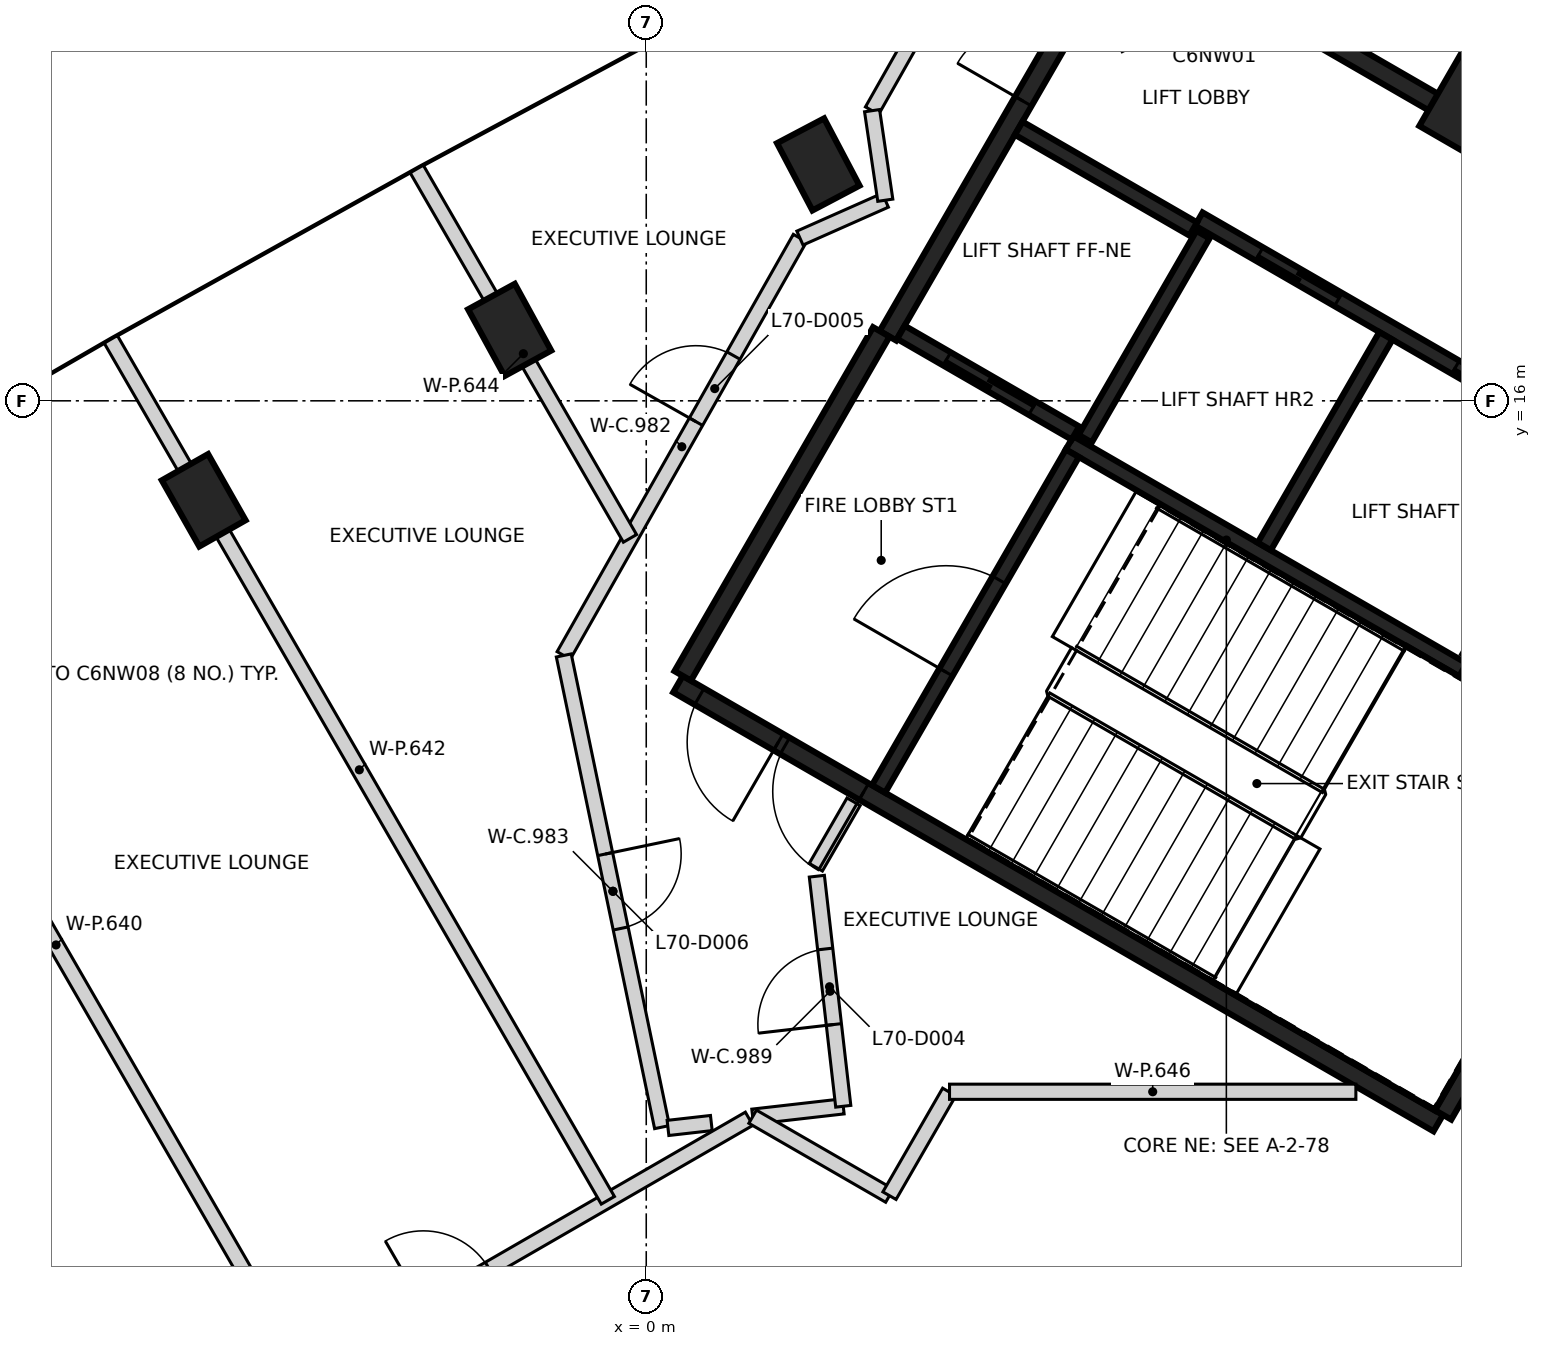
"""IFC4 building model, lengths in metres.
Left out: names, types, materials, properties, quantities, classifications, styles, units other than length and angle.
Written with IfcOpenShell. Run it as: python <this file> out.ifc"""

import sys

from ifc_helpers import new_model, si_unit, direction, frame, frame_2d, origin, origin_2d, place, context, subcontext, project, spatial, rectangle, extrude, element, fill, save


model = new_model("IFC4")
c1 = context("Model", 3, precision=1e-05, world=origin(), true_north=direction((0.0, 1.0)))
c2 = subcontext(c1, "Body", "Model", "MODEL_VIEW")
j1 = project(units=[si_unit("LENGTHUNIT", "METRE"), si_unit("PLANEANGLEUNIT", "RADIAN")], contexts=[c1])
p1 = place(None, origin())
s1 = spatial("IfcSite", under=j1, at=p1, CompositionType="ELEMENT")
p2 = place(p1, origin())
s2 = spatial("IfcBuilding", under=s1, at=p2, CompositionType="ELEMENT")
p3 = place(p2, frame((0.0, 0.0, 276.6)))
s3 = spatial("IfcBuildingStorey", under=s2, at=p3, CompositionType="ELEMENT", Elevation=276.6)
for number, where, z_axis, x_axis in (
    (1, (2.263, 19.11, -0.35), (0.0, 0.0, 1.0), (-0.466, 0.885, 0.0)),
    (2, (-1.797, 16.932, -0.35), (0.0, 0.0, 1.0), (-0.479, 0.878, 0.0)),
    (3, (-5.822, 14.691, -0.35), (0.0, 0.0, 1.0), (-0.493, 0.87, 0.0)),
):
    element("IfcColumn", number, at=place(p3, frame(where, z_axis=z_axis, x_axis=x_axis)), inside=s3, PredefinedType="COLUMN", context=c2, shape_type="SweptSolid", body=[
        extrude(rectangle(XDim=1.0, YDim=0.7, at=origin_2d()), origin(), (0.0, 0.0, 1.0), 3.6),
    ])
p4 = place(p3, frame((11.637, 20.155, -0.35), z_axis=(0.0, 0.0, 1.0), x_axis=(0.5, 0.866025403784, 0.0)))
e4 = element("IfcColumn", 4, at=p4, inside=s3, PredefinedType="COLUMN", context=c2, shape_type="SweptSolid", body=[
    extrude(rectangle(XDim=2.4, YDim=2.0, at=origin_2d()), origin(), (0.0, 0.0, 1.0), 3.6),
])
p5 = place(p3, frame((10.42, 6.498, 0.0), z_axis=(0.0, 0.0, 1.0), x_axis=(-0.866021906294, 0.500006057782, 0.0)))
e5 = element("IfcWall", 5, at=p5, inside=s3, PredefinedType="SHEAR", context=c2, shape_type="SweptSolid", body=[
    extrude(rectangle(XDim=11.55, YDim=0.25, at=frame_2d((5.775, 0.0))), origin(), (0.0, 0.0, 1.0), 3.25),
])
p6 = place(p5, frame((10.025, 0.0, 0.0)))
e6 = element("IfcOpeningElement", 6, at=p6, cuts=e5, PredefinedType="OPENING", context=c2, shape_type="SweptSolid", body=[
    extrude(rectangle(XDim=1.2, YDim=2.1, at=frame_2d((0.6, 1.05))), frame((0.0, 0.135, 0.0), z_axis=(0.0, -1.0, 0.0), x_axis=(1.0, 0.0, 0.0)), (0.0, 0.0, 1.0), 0.27),
])
p7 = place(p5, frame((8.725, 0.0, 0.0)))
e7 = element("IfcOpeningElement", 7, at=p7, cuts=e5, PredefinedType="OPENING", context=c2, shape_type="SweptSolid", body=[
    extrude(rectangle(XDim=1.2, YDim=2.1, at=frame_2d((0.6, 1.05))), frame((0.0, 0.135, 0.0), z_axis=(0.0, -1.0, 0.0), x_axis=(1.0, 0.0, 0.0)), (0.0, 0.0, 1.0), 0.27),
])
p8 = place(p3, frame((6.304, 22.269, 0.0), z_axis=(0.0, 0.0, 1.0), x_axis=(0.866022959057, -0.500004234368, 0.0)))
e8 = element("IfcWall", 8, at=p8, inside=s3, PredefinedType="SHEAR", context=c2, shape_type="SweptSolid", body=[
    extrude(rectangle(XDim=8.75, YDim=0.25, at=frame_2d((4.375, 0.0))), origin(), (0.0, 0.0, 1.0), 3.25),
])
p9 = place(p3, frame((3.179, 16.856, 0.0), z_axis=(0.0, 0.0, 1.0), x_axis=(0.500001955336, 0.866024274868, 0.0)))
e9 = element("IfcWall", 9, at=p9, inside=s3, PredefinedType="SHEAR", context=c2, shape_type="SweptSolid", body=[
    extrude(rectangle(XDim=6.125, YDim=0.25, at=frame_2d((3.062, 0.0))), origin(), (0.0, 0.0, 1.0), 3.25),
])
p10 = place(p9, frame((3.563, 0.0, 0.0)))
e10 = element("IfcOpeningElement", 10, at=p10, cuts=e9, PredefinedType="OPENING", context=c2, shape_type="SweptSolid", body=[
    extrude(rectangle(XDim=1.0, YDim=2.1, at=frame_2d((0.5, 1.05))), frame((0.0, 0.135, 0.0), z_axis=(0.0, -1.0, 0.0), x_axis=(1.0, 0.0, 0.0)), (0.0, 0.0, 1.0), 0.27),
])
p11 = place(p3, frame((0.48, 12.381, 0.0), z_axis=(0.0, 0.0, 1.0), x_axis=(0.49999885962, 0.866026062182, 0.0)))
e11 = element("IfcWall", 11, at=p11, inside=s3, PredefinedType="SHEAR", context=c2, shape_type="SweptSolid", body=[
    extrude(rectangle(XDim=5.225, YDim=0.25, at=frame_2d((2.612, 0.0))), origin(), (0.0, 0.0, 1.0), 3.25),
])
p12 = place(p3, frame((13.238, 11.378, 0.0), z_axis=(0.0, 0.0, 1.0), x_axis=(-0.500008851346, -0.866020293397, 0.0)))
e12 = element("IfcWall", 12, at=p12, inside=s3, PredefinedType="SHEAR", context=c2, shape_type="SweptSolid", body=[
    extrude(rectangle(XDim=5.51, YDim=0.25, at=frame_2d((2.755, 0.0))), origin(), (0.0, 0.0, 1.0), 3.25),
])
p13 = place(p3, frame((10.757, 12.481, 0.0), z_axis=(0.0, 0.0, 1.0), x_axis=(0.866022940537, -0.500004266446, 0.0)))
e13 = element("IfcWall", 13, at=p13, inside=s3, PredefinedType="SHEAR", context=c2, shape_type="SweptSolid", body=[
    extrude(rectangle(XDim=2.575, YDim=0.25, at=frame_2d((1.287, 0.0))), origin(), (0.0, 0.0, 1.0), 3.25),
])
p14 = place(p3, frame((12.552, 15.342, 0.0), z_axis=(0.0, 0.0, 1.0), x_axis=(-0.866030299012, 0.499991521122, 0.0)))
e14 = element("IfcWall", 14, at=p14, inside=s3, PredefinedType="SHEAR", context=c2, shape_type="SweptSolid", body=[
    extrude(rectangle(XDim=6.1, YDim=0.2, at=frame_2d((3.05, 0.0))), origin(), (0.0, 0.0, 1.0), 3.25),
])
p15 = place(p14, frame((1.0, 0.0, 0.0)))
e15 = element("IfcOpeningElement", 15, at=p15, cuts=e14, PredefinedType="OPENING", context=c2, shape_type="SweptSolid", body=[
    extrude(rectangle(XDim=1.2, YDim=2.1, at=frame_2d((0.6, 1.05))), frame((0.0, 0.11, 0.0), z_axis=(0.0, -1.0, 0.0), x_axis=(1.0, 0.0, 0.0)), (0.0, 0.0, 1.0), 0.22),
])
p16 = place(p14, frame((3.982, 0.0, 0.0)))
e16 = element("IfcOpeningElement", 16, at=p16, cuts=e14, PredefinedType="OPENING", context=c2, shape_type="SweptSolid", body=[
    extrude(rectangle(XDim=1.2, YDim=2.1, at=frame_2d((0.6, 1.05))), frame((0.0, 0.11, 0.0), z_axis=(0.0, -1.0, 0.0), x_axis=(1.0, 0.0, 0.0)), (0.0, 0.0, 1.0), 0.22),
])
p17 = place(p3, frame((10.743, 12.46, 0.0), z_axis=(0.0, 0.0, 1.0), x_axis=(-0.866018848283, 0.500011354289, 0.0)))
e17 = element("IfcWall", 17, at=p17, inside=s3, PredefinedType="SHEAR", context=c2, shape_type="SweptSolid", body=[
    extrude(rectangle(XDim=5.974, YDim=0.2, at=frame_2d((2.987, 0.0))), origin(), (0.0, 0.0, 1.0), 3.25),
])
p18 = place(p3, frame((3.057, 10.895, 0.0), z_axis=(0.0, 0.0, 1.0), x_axis=(0.500027839223, 0.866009330205, 0.0)))
e18 = element("IfcWall", 18, at=p18, inside=s3, PredefinedType="SHEAR", context=c2, shape_type="SweptSolid", body=[
    extrude(rectangle(XDim=5.098, YDim=0.2, at=frame_2d((2.549, 0.0))), origin(), (0.0, 0.0, 1.0), 3.25),
])
p19 = place(p18, frame((1.774, 0.0, 0.0)))
e19 = element("IfcOpeningElement", 19, at=p19, cuts=e18, PredefinedType="OPENING", context=c2, shape_type="SweptSolid", body=[
    extrude(rectangle(XDim=1.4, YDim=2.1, at=frame_2d((0.7, 1.05))), frame((0.0, 0.11, 0.0), z_axis=(0.0, -1.0, 0.0), x_axis=(1.0, 0.0, 0.0)), (0.0, 0.0, 1.0), 0.22),
])
p20 = place(p3, frame((8.132, 14.084, 0.0), z_axis=(0.0, 0.0, 1.0), x_axis=(0.500030834389, 0.86600760081, 0.0)))
e20 = element("IfcWall", 20, at=p20, inside=s3, PredefinedType="SHEAR", context=c2, shape_type="SweptSolid", body=[
    extrude(rectangle(XDim=3.198, YDim=0.2, at=frame_2d((1.599, 0.0))), origin(), (0.0, 0.0, 1.0), 3.25),
])
p21 = place(p3, frame((7.324, 18.187, 0.0), z_axis=(0.0, 0.0, 1.0), x_axis=(-0.499967891604, -0.866043940782, 0.0)))
e21 = element("IfcWall", 21, at=p21, inside=s3, PredefinedType="SHEAR", context=c2, shape_type="SweptSolid", body=[
    extrude(rectangle(XDim=3.1, YDim=0.2, at=frame_2d((1.55, 0.0))), origin(), (0.0, 0.0, 1.0), 3.25),
])
p22 = place(p3, frame((5.646, 15.576, 0.0), z_axis=(0.0, 0.0, 1.0), x_axis=(-0.866018407898, 0.500012117035, 0.0)))
e22 = element("IfcWall", 22, at=p22, inside=s3, PredefinedType="SHEAR", context=c2, shape_type="SweptSolid", body=[
    extrude(rectangle(XDim=2.651, YDim=0.2, at=frame_2d((1.325, 0.0))), origin(), (0.0, 0.0, 1.0), 3.25),
])
p23 = place(p22, frame((0.652, 0.0, 0.0)))
e23 = element("IfcOpeningElement", 23, at=p23, cuts=e22, PredefinedType="OPENING", context=c2, shape_type="SweptSolid", body=[
    extrude(rectangle(XDim=1.3, YDim=2.1, at=frame_2d((0.65, 1.05))), frame((0.0, 0.11, 0.0), z_axis=(0.0, -1.0, 0.0), x_axis=(1.0, 0.0, 0.0)), (0.0, 0.0, 1.0), 0.22),
])
p24 = place(p3, frame((7.196, 18.26, 0.0), z_axis=(0.0, 0.0, 1.0), x_axis=(-0.866018407898, 0.500012117035, 0.0)))
e24 = element("IfcWall", 24, at=p24, inside=s3, PredefinedType="SHEAR", context=c2, shape_type="SweptSolid", body=[
    extrude(rectangle(XDim=2.651, YDim=0.2, at=frame_2d((1.325, 0.0))), origin(), (0.0, 0.0, 1.0), 3.25),
])
p25 = place(p3, frame((-6.4, 2.079, 0.0), z_axis=(0.0, 0.0, 1.0), x_axis=(0.866044821263, 0.499966366432, 0.0)))
e25 = element("IfcWall", 25, at=p25, inside=s3, PredefinedType="PARTITIONING", context=c2, shape_type="SweptSolid", body=[
    extrude(rectangle(XDim=8.953, YDim=0.2, at=frame_2d((4.477, 0.0))), origin(), (0.0, 0.0, 1.0), 3.25),
])
p26 = place(p25, frame((4.003, 0.0, 0.0)))
e26 = element("IfcOpeningElement", 26, at=p26, cuts=e25, PredefinedType="OPENING", context=c2, shape_type="SweptSolid", body=[
    extrude(rectangle(XDim=1.0, YDim=2.1, at=frame_2d((0.5, 1.05))), frame((0.0, 0.11, 0.0), z_axis=(0.0, -1.0, 0.0), x_axis=(1.0, 0.0, 0.0)), (0.0, 0.0, 1.0), 0.22),
])
p27 = place(p3, frame((-1.086, 12.65, 0.0), z_axis=(0.0, 0.0, 1.0), x_axis=(0.492563383526, 0.870276572826, 0.0)))
e27 = element("IfcWall", 27, at=p27, inside=s3, PredefinedType="PARTITIONING", context=c2, shape_type="SweptSolid", body=[
    extrude(rectangle(XDim=6.309, YDim=0.2, at=frame_2d((3.155, 0.0))), origin(), (0.0, 0.0, 1.0), 3.25),
])
p28 = place(p27, frame((3.533, 0.0, 0.0)))
e28 = element("IfcOpeningElement", 28, at=p28, cuts=e27, PredefinedType="OPENING", context=c2, shape_type="SweptSolid", body=[
    extrude(rectangle(XDim=1.0, YDim=2.1, at=frame_2d((0.5, 1.05))), frame((0.0, 0.11, 0.0), z_axis=(0.0, -1.0, 0.0), x_axis=(1.0, 0.0, 0.0)), (0.0, 0.0, 1.0), 0.22),
])
p29 = place(p3, frame((-1.085, 12.65, 0.0), z_axis=(0.0, 0.0, 1.0), x_axis=(0.203998862084, -0.97897112535, 0.0)))
e29 = element("IfcWall", 29, at=p29, inside=s3, PredefinedType="PARTITIONING", context=c2, shape_type="SweptSolid", body=[
    extrude(rectangle(XDim=6.338, YDim=0.2, at=frame_2d((3.169, 0.0))), origin(), (0.0, 0.0, 1.0), 3.25),
])
p30 = place(p29, frame((2.669, 0.0, 0.0)))
e30 = element("IfcOpeningElement", 30, at=p30, cuts=e29, PredefinedType="OPENING", context=c2, shape_type="SweptSolid", body=[
    extrude(rectangle(XDim=1.0, YDim=2.1, at=frame_2d((0.5, 1.05))), frame((0.0, 0.11, 0.0), z_axis=(0.0, -1.0, 0.0), x_axis=(1.0, 0.0, 0.0)), (0.0, 0.0, 1.0), 0.22),
])
p31 = place(p3, frame((0.286, 6.434, 0.0), z_axis=(0.0, 0.0, 1.0), x_axis=(0.993674480486, 0.112298828274, 0.0)))
e31 = element("IfcWall", 31, at=p31, inside=s3, PredefinedType="PARTITIONING", context=c2, shape_type="SweptSolid", body=[
    extrude(rectangle(XDim=0.574, YDim=0.2, at=frame_2d((0.287, 0.0))), origin(), (0.0, 0.0, 1.0), 3.25),
])
p32 = place(p3, frame((1.4, 6.582, 0.0), z_axis=(0.0, 0.0, 1.0), x_axis=(0.993556915844, 0.11333426216, 0.0)))
e32 = element("IfcWall", 32, at=p32, inside=s3, PredefinedType="PARTITIONING", context=c2, shape_type="SweptSolid", body=[
    extrude(rectangle(XDim=1.2, YDim=0.2, at=frame_2d((0.6, 0.0))), origin(), (0.0, 0.0, 1.0), 3.25),
])
p33 = place(p3, frame((1.4, 6.582, 0.0), z_axis=(0.0, 0.0, 1.0), x_axis=(0.866066271601, -0.499929208183, 0.0)))
e33 = element("IfcWall", 33, at=p33, inside=s3, PredefinedType="PARTITIONING", context=c2, shape_type="SweptSolid", body=[
    extrude(rectangle(XDim=2.078, YDim=0.2, at=frame_2d((1.039, 0.0))), origin(), (0.0, 0.0, 1.0), 3.25),
])
p34 = place(p3, frame((2.022, 18.141, 0.0), z_axis=(0.0, 0.0, 1.0), x_axis=(0.914212683456, 0.405234709036, 0.0)))
e34 = element("IfcWall", 34, at=p34, inside=s3, PredefinedType="PARTITIONING", context=c2, shape_type="SweptSolid", body=[
    extrude(rectangle(XDim=1.229, YDim=0.2, at=frame_2d((0.614, 0.0))), origin(), (0.0, 0.0, 1.0), 3.25),
])
p35 = place(p3, frame((2.592, 6.719, 0.0), z_axis=(0.0, 0.0, 1.0), x_axis=(-0.114027951455, 0.993477541914, 0.0)))
e35 = element("IfcWall", 35, at=p35, inside=s3, PredefinedType="PARTITIONING", context=c2, shape_type="SweptSolid", body=[
    extrude(rectangle(XDim=3.047, YDim=0.2, at=frame_2d((1.523, 0.0))), origin(), (0.0, 0.0, 1.0), 3.25),
])
p36 = place(p35, frame((1.083, 0.0, 0.0)))
e36 = element("IfcOpeningElement", 36, at=p36, cuts=e35, PredefinedType="OPENING", context=c2, shape_type="SweptSolid", body=[
    extrude(rectangle(XDim=1.0, YDim=2.1, at=frame_2d((0.5, 1.05))), frame((0.0, 0.11, 0.0), z_axis=(0.0, -1.0, 0.0), x_axis=(1.0, 0.0, 0.0)), (0.0, 0.0, 1.0), 0.22),
])
p37 = place(p3, frame((2.231, 9.864, 0.0), z_axis=(0.0, 0.0, 1.0), x_axis=(0.499942098031, 0.866058830921, 0.0)))
e37 = element("IfcWall", 37, at=p37, inside=s3, PredefinedType="PARTITIONING", context=c2, shape_type="SweptSolid", body=[
    extrude(rectangle(XDim=0.994, YDim=0.2, at=frame_2d((0.497, 0.0))), origin(), (0.0, 0.0, 1.0), 3.25),
])
p38 = place(p3, frame((2.971, 19.817, 0.0), z_axis=(0.0, 0.0, 1.0), x_axis=(0.492596700535, 0.870257715061, 0.0)))
e38 = element("IfcWall", 38, at=p38, inside=s3, PredefinedType="PARTITIONING", context=c2, shape_type="SweptSolid", body=[
    extrude(rectangle(XDim=2.296, YDim=0.2, at=frame_2d((1.148, 0.0))), origin(), (0.0, 0.0, 1.0), 3.25),
])
p39 = place(p3, frame((2.971, 19.817, 0.0), z_axis=(0.0, 0.0, 1.0), x_axis=(0.146184555477, -0.989257335449, 0.0)))
e39 = element("IfcWall", 39, at=p39, inside=s3, PredefinedType="PARTITIONING", context=c2, shape_type="SweptSolid", body=[
    extrude(rectangle(XDim=1.191, YDim=0.2, at=frame_2d((0.595, 0.0))), origin(), (0.0, 0.0, 1.0), 2.35),
])
p40 = place(p3, frame((-11.035, 14.505, 0.0), z_axis=(0.0, 0.0, 1.0), x_axis=(0.499989597041, -0.866031409852, 0.0)))
e40 = element("IfcWall", 40, at=p40, inside=s3, PredefinedType="PARTITIONING", context=c2, shape_type="SweptSolid", body=[
    extrude(rectangle(XDim=13.079, YDim=0.2, at=frame_2d((6.54, 0.0))), origin(), (0.0, 0.0, 1.0), 3.25),
])
p41 = place(p3, frame((-7.044, 16.809, 0.0), z_axis=(0.0, 0.0, 1.0), x_axis=(0.499997679687, -0.866026743414, 0.0)))
e41 = element("IfcWall", 41, at=p41, inside=s3, PredefinedType="PARTITIONING", context=c2, shape_type="SweptSolid", body=[
    extrude(rectangle(XDim=13.079, YDim=0.2, at=frame_2d((6.54, 0.0))), origin(), (0.0, 0.0, 1.0), 3.25),
])
p42 = place(p3, frame((-3.02, 19.05, 0.0), z_axis=(0.0, 0.0, 1.0), x_axis=(0.499943402613, -0.866058077835, 0.0)))
e42 = element("IfcWall", 42, at=p42, inside=s3, PredefinedType="PARTITIONING", context=c2, shape_type="SweptSolid", body=[
    extrude(rectangle(XDim=5.612, YDim=0.2, at=frame_2d((2.806, 0.0))), origin(), (0.0, 0.0, 1.0), 3.25),
])
p43 = place(p3, frame((3.2, 5.543, 0.0), z_axis=(0.0, 0.0, 1.0), x_axis=(0.499342032259, 0.86640494852, 0.0)))
e43 = element("IfcWall", 43, at=p43, inside=s3, PredefinedType="PARTITIONING", context=c2, shape_type="SweptSolid", body=[
    extrude(rectangle(XDim=1.574, YDim=0.2, at=frame_2d((0.787, 0.0))), origin(), (0.0, 0.0, 1.0), 3.25),
])
p44 = place(p3, frame((3.99, 6.91, 0.0), z_axis=(0.0, 0.0, 1.0), x_axis=(1.0, 0.0, 0.0)))
e44 = element("IfcWall", 44, at=p44, inside=s3, PredefinedType="PARTITIONING", context=c2, shape_type="SweptSolid", body=[
    extrude(rectangle(XDim=5.346, YDim=0.2, at=frame_2d((2.673, 0.0))), origin(), (0.0, 0.0, 1.0), 3.25),
])
p45 = place(p23, origin())
e45 = element("IfcDoor", 45, at=p45, inside=s3, OperationType="SLIDING_TO_RIGHT", PredefinedType="DOOR", context=c2, shape_type="SweptSolid", body=[
    extrude(rectangle(XDim=1.3, YDim=2.1, at=frame_2d((0.65, 1.05))), frame((0.0, 0.025, 0.0), z_axis=(0.0, -1.0, 0.0), x_axis=(1.0, 0.0, 0.0)), (0.0, 0.0, 1.0), 0.05),
])
fill(e23, e45)
p46 = place(p15, origin())
e46 = element("IfcDoor", 46, at=p46, inside=s3, OperationType="DOUBLE_DOOR_SLIDING", PredefinedType="DOOR", context=c2, shape_type="SweptSolid", body=[
    extrude(rectangle(XDim=1.2, YDim=2.1, at=frame_2d((0.6, 1.05))), frame((0.0, 0.025, 0.0), z_axis=(0.0, -1.0, 0.0), x_axis=(1.0, 0.0, 0.0)), (0.0, 0.0, 1.0), 0.05),
])
fill(e15, e46)
p47 = place(p16, origin())
e47 = element("IfcDoor", 47, at=p47, inside=s3, OperationType="DOUBLE_DOOR_SLIDING", PredefinedType="DOOR", context=c2, shape_type="SweptSolid", body=[
    extrude(rectangle(XDim=1.2, YDim=2.1, at=frame_2d((0.6, 1.05))), frame((0.0, 0.025, 0.0), z_axis=(0.0, -1.0, 0.0), x_axis=(1.0, 0.0, 0.0)), (0.0, 0.0, 1.0), 0.05),
])
fill(e16, e47)
p48 = place(p10, origin())
e48 = element("IfcDoor", 48, at=p48, inside=s3, OperationType="SINGLE_SWING_LEFT", PredefinedType="DOOR", context=c2, shape_type="SweptSolid", body=[
    extrude(rectangle(XDim=1.0, YDim=2.1, at=frame_2d((0.5, 1.05))), frame((0.0, 0.025, 0.0), z_axis=(0.0, -1.0, 0.0), x_axis=(1.0, 0.0, 0.0)), (0.0, 0.0, 1.0), 0.05),
])
fill(e10, e48)
p49 = place(p6, origin())
e49 = element("IfcDoor", 49, at=p49, inside=s3, OperationType="SINGLE_SWING_LEFT", PredefinedType="DOOR", context=c2, shape_type="SweptSolid", body=[
    extrude(rectangle(XDim=1.2, YDim=2.1, at=frame_2d((0.6, 1.05))), frame((0.0, 0.025, 0.0), z_axis=(0.0, -1.0, 0.0), x_axis=(1.0, 0.0, 0.0)), (0.0, 0.0, 1.0), 0.05),
])
fill(e6, e49)
p50 = place(p7, origin())
e50 = element("IfcDoor", 50, at=p50, inside=s3, OperationType="SINGLE_SWING_RIGHT", PredefinedType="DOOR", context=c2, shape_type="SweptSolid", body=[
    extrude(rectangle(XDim=1.2, YDim=2.1, at=frame_2d((0.6, 1.05))), frame((0.0, 0.025, 0.0), z_axis=(0.0, -1.0, 0.0), x_axis=(1.0, 0.0, 0.0)), (0.0, 0.0, 1.0), 0.05),
])
fill(e7, e50)
p51 = place(p19, origin())
e51 = element("IfcDoor", 51, at=p51, inside=s3, OperationType="SINGLE_SWING_RIGHT", PredefinedType="DOOR", context=c2, shape_type="SweptSolid", body=[
    extrude(rectangle(XDim=1.4, YDim=2.1, at=frame_2d((0.7, 1.05))), frame((0.0, 0.025, 0.0), z_axis=(0.0, -1.0, 0.0), x_axis=(1.0, 0.0, 0.0)), (0.0, 0.0, 1.0), 0.05),
])
fill(e19, e51)
p52 = place(p36, origin())
e52 = element("IfcDoor", 52, at=p52, inside=s3, OperationType="SINGLE_SWING_LEFT", PredefinedType="DOOR", context=c2, shape_type="SweptSolid", body=[
    extrude(rectangle(XDim=1.0, YDim=2.1, at=frame_2d((0.5, 1.05))), frame((0.0, 0.025, 0.0), z_axis=(0.0, -1.0, 0.0), x_axis=(1.0, 0.0, 0.0)), (0.0, 0.0, 1.0), 0.05),
])
fill(e36, e52)
p53 = place(p28, frame((1.0, 0.0, 0.0), z_axis=(0.0, 0.0, 1.0), x_axis=(-1.0, 0.0, 0.0)))
e53 = element("IfcDoor", 53, at=p53, inside=s3, OperationType="SINGLE_SWING_LEFT", PredefinedType="DOOR", context=c2, shape_type="SweptSolid", body=[
    extrude(rectangle(XDim=1.0, YDim=2.1, at=frame_2d((0.5, 1.05))), frame((0.0, 0.025, 0.0), z_axis=(0.0, -1.0, 0.0), x_axis=(1.0, 0.0, 0.0)), (0.0, 0.0, 1.0), 0.05),
])
fill(e28, e53)
p54 = place(p30, frame((1.0, 0.0, 0.0), z_axis=(0.0, 0.0, 1.0), x_axis=(-1.0, 0.0, 0.0)))
e54 = element("IfcDoor", 54, at=p54, inside=s3, OperationType="SINGLE_SWING_LEFT", PredefinedType="DOOR", context=c2, shape_type="SweptSolid", body=[
    extrude(rectangle(XDim=1.0, YDim=2.1, at=frame_2d((0.5, 1.05))), frame((0.0, 0.025, 0.0), z_axis=(0.0, -1.0, 0.0), x_axis=(1.0, 0.0, 0.0)), (0.0, 0.0, 1.0), 0.05),
])
fill(e30, e54)
save(model, sys.argv[1])
